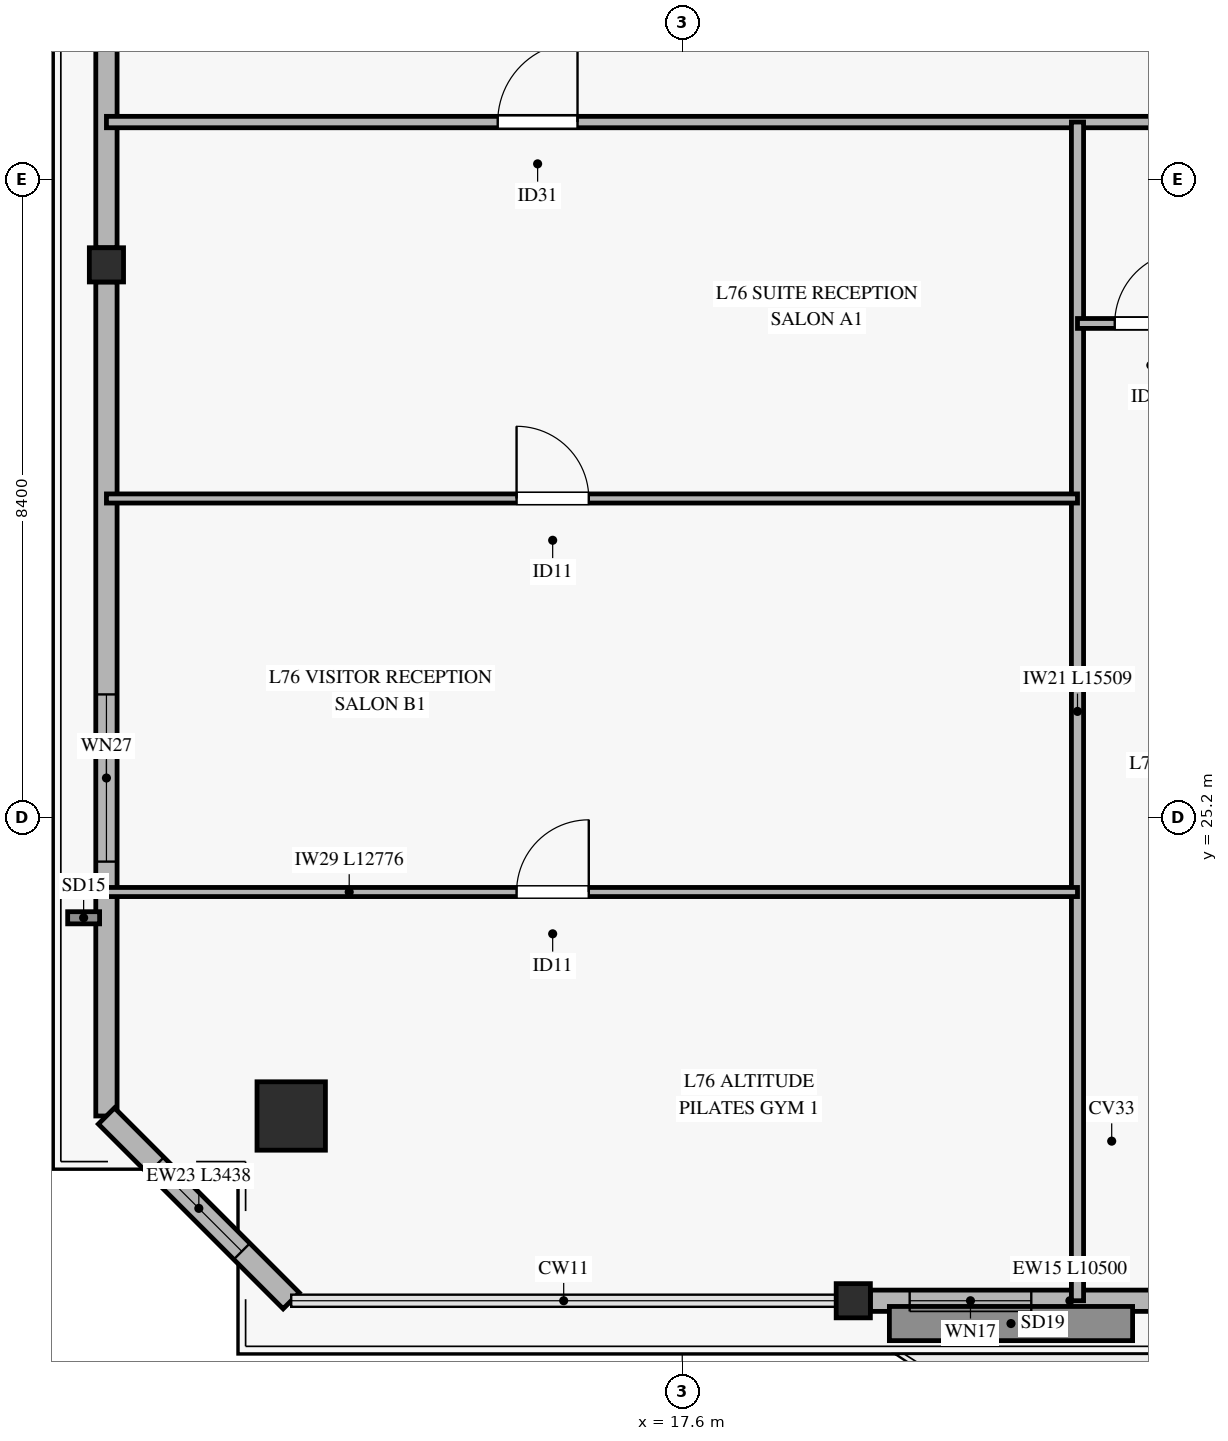
"""IFC4 building model, lengths in metres.
Left out: names, types, materials, properties, quantities, classifications, styles, units other than length and angle.
Written with IfcOpenShell. Run it as: python <this file> out.ifc"""

import sys

from ifc_helpers import new_model, si_unit, direction, frame, frame_2d, origin, origin_2d, place, context, subcontext, project, spatial, rectangle, hollow_rectangle, extrude, source, transform, mapped, element, fill, save


model = new_model("IFC4")
c1 = context("Model", 3, precision=1e-05, world=origin(), true_north=direction((0.0, 1.0)))
c2 = subcontext(c1, "Body", "Model", "MODEL_VIEW")
j1 = project(units=[si_unit("LENGTHUNIT", "METRE"), si_unit("PLANEANGLEUNIT", "RADIAN")], contexts=[c1])
p1 = place(None, origin())
s1 = spatial("IfcSite", under=j1, at=p1, CompositionType="ELEMENT")
p2 = place(p1, origin())
s2 = spatial("IfcBuilding", under=s1, at=p2, CompositionType="ELEMENT")
p3 = place(p2, frame((0.0, 0.0, 297.2)))
s3 = spatial("IfcBuildingStorey", under=s2, at=p3, CompositionType="ELEMENT", Elevation=297.2)
m1 = source(origin(), c2, "Body", "SweptSolid", [
    extrude(hollow_rectangle(XDim=0.9, YDim=0.9, WallThickness=0.04, at=origin_2d()), origin(), (0.0, 0.0, 1.0), 3.185),
])
p4 = place(p3, frame((12.455, 21.272, 0.0), z_axis=(0.0, 0.0, 1.0), x_axis=(1.0, 0.0, 0.0)))
e1 = element("IfcColumn", 1, at=p4, inside=s3, PredefinedType="COLUMN", context=c2, shape_type="MappedRepresentation", body=[
    mapped(m1, transform((0.0, 0.0, 0.0), x_axis=(1.0, 0.0, 0.0), y_axis=(0.0, 1.0, 0.0), z_axis=(0.0, 0.0, 1.0), scale=1.0)),
])
m2 = source(origin(), c2, "Body", "SweptSolid", [
    extrude(hollow_rectangle(XDim=0.45, YDim=0.45, WallThickness=0.022, at=origin_2d()), origin(), (0.0, 0.0, 1.0), 3.185),
])
for number, where, z_axis, x_axis in (
    (2, (19.85, 18.841, 0.0), (0.0, 0.0, 1.0), (1.0, 0.0, 0.0)),
    (3, (10.024, 32.471, 0.0), (0.0, 0.0, 1.0), (1.0, 0.0, 0.0)),
):
    element("IfcColumn", number, at=place(p3, frame(where, z_axis=z_axis, x_axis=x_axis)), inside=s3, PredefinedType="COLUMN", context=c2, shape_type="MappedRepresentation", body=[
        mapped(m2, transform((0.0, 0.0, 0.0), x_axis=(1.0, 0.0, 0.0), y_axis=(0.0, 1.0, 0.0), z_axis=(0.0, 0.0, 1.0), scale=1.0)),
    ])
p5 = place(p3, frame((20.075, 18.841, 0.0), z_axis=(0.0, 0.0, 1.0), x_axis=(1.0, 0.0, 0.0)))
e4 = element("IfcWall", 4, at=p5, inside=s3, PredefinedType="SOLIDWALL", context=c2, shape_type="SweptSolid", body=[
    extrude(rectangle(XDim=10.5, YDim=0.28, at=frame_2d((5.25, 0.0))), origin(), (0.0, 0.0, 1.0), 2.815),
])
p6 = place(p5, frame((4.325, 0.0, 0.0)))
e5 = element("IfcOpeningElement", 5, at=p6, cuts=e4, PredefinedType="OPENING", context=c2, shape_type="SweptSolid", body=[
    extrude(rectangle(XDim=1.8, YDim=2.25, at=frame_2d((0.9, 1.125))), frame((0.0, 0.15, 0.0), z_axis=(0.0, -1.0, 0.0), x_axis=(1.0, 0.0, 0.0)), (0.0, 0.0, 1.0), 0.3),
])
p7 = place(p5, frame((0.517, 0.0, 0.45)))
e6 = element("IfcOpeningElement", 6, at=p7, cuts=e4, PredefinedType="OPENING", context=c2, shape_type="SweptSolid", body=[
    extrude(rectangle(XDim=1.6, YDim=2.0, at=frame_2d((0.8, 1.0))), frame((0.0, 0.15, 0.0), z_axis=(0.0, -1.0, 0.0), x_axis=(1.0, 0.0, 0.0)), (0.0, 0.0, 1.0), 0.3),
])
p8 = place(p5, frame((7.305, 0.0, 0.45)))
e7 = element("IfcOpeningElement", 7, at=p8, cuts=e4, PredefinedType="OPENING", context=c2, shape_type="SweptSolid", body=[
    extrude(rectangle(XDim=1.6, YDim=2.0, at=frame_2d((0.8, 1.0))), frame((0.0, 0.15, 0.0), z_axis=(0.0, -1.0, 0.0), x_axis=(1.0, 0.0, 0.0)), (0.0, 0.0, 1.0), 0.3),
])
p9 = place(p3, frame((10.024, 21.272, 0.0), z_axis=(0.0, 0.0, 1.0), x_axis=(0.0, 1.0, 0.0)))
e8 = element("IfcWall", 8, at=p9, inside=s3, PredefinedType="SOLIDWALL", context=c2, shape_type="SweptSolid", body=[
    extrude(rectangle(XDim=10.974, YDim=0.28, at=frame_2d((5.487, 0.0))), origin(), (0.0, 0.0, 1.0), 2.815),
])
p10 = place(p9, frame((3.347, 0.0, 0.45)))
e9 = element("IfcOpeningElement", 9, at=p10, cuts=e8, PredefinedType="OPENING", context=c2, shape_type="SweptSolid", body=[
    extrude(rectangle(XDim=2.2, YDim=2.1, at=frame_2d((1.1, 1.05))), frame((0.0, 0.15, 0.0), z_axis=(0.0, -1.0, 0.0), x_axis=(1.0, 0.0, 0.0)), (0.0, 0.0, 1.0), 0.3),
])
p11 = place(p3, frame((10.024, 32.696, 0.0), z_axis=(0.0, 0.0, 1.0), x_axis=(0.0, 1.0, 0.0)))
e10 = element("IfcWall", 10, at=p11, inside=s3, PredefinedType="SOLIDWALL", context=c2, shape_type="SweptSolid", body=[
    extrude(rectangle(XDim=10.973, YDim=0.28, at=frame_2d((5.486, 0.0))), origin(), (0.0, 0.0, 1.0), 2.815),
])
p12 = place(p11, frame((6.488, 0.0, 0.45)))
e11 = element("IfcOpeningElement", 11, at=p12, cuts=e10, PredefinedType="OPENING", context=c2, shape_type="SweptSolid", body=[
    extrude(rectangle(XDim=2.2, YDim=2.1, at=frame_2d((1.1, 1.05))), frame((0.0, 0.15, 0.0), z_axis=(0.0, -1.0, 0.0), x_axis=(1.0, 0.0, 0.0)), (0.0, 0.0, 1.0), 0.3),
])
p13 = place(p3, frame((10.024, 21.272, 0.0), z_axis=(0.0, 0.0, 1.0), x_axis=(0.707142286536, -0.707071274055, 0.0)))
e12 = element("IfcWall", 12, at=p13, inside=s3, PredefinedType="SOLIDWALL", context=c2, shape_type="SweptSolid", body=[
    extrude(rectangle(XDim=3.438, YDim=0.3, at=frame_2d((1.719, 0.0))), origin(), (0.0, 0.0, 1.0), 2.815),
])
p14 = place(p13, frame((0.919, 0.0, 0.45)))
e13 = element("IfcOpeningElement", 13, at=p14, cuts=e12, PredefinedType="OPENING", context=c2, shape_type="SweptSolid", body=[
    extrude(rectangle(XDim=1.6, YDim=2.0, at=frame_2d((0.8, 1.0))), frame((0.0, 0.16, 0.0), z_axis=(0.0, -1.0, 0.0), x_axis=(1.0, 0.0, 0.0)), (0.0, 0.0, 1.0), 0.32),
])
p15 = place(p3, frame((10.024, 34.35, 0.0), z_axis=(0.0, 0.0, 1.0), x_axis=(1.0, 0.0, 0.0)))
e14 = element("IfcWall", 14, at=p15, inside=s3, PredefinedType="PARTITIONING", context=c2, shape_type="SweptSolid", body=[
    extrude(rectangle(XDim=50.352, YDim=0.15, at=frame_2d((25.176, 0.0))), origin(), (0.0, 0.0, 1.0), 2.47),
])
p16 = place(p15, frame((5.148, 0.0, 0.0)))
e15 = element("IfcOpeningElement", 15, at=p16, cuts=e14, PredefinedType="OPENING", context=c2, shape_type="SweptSolid", body=[
    extrude(rectangle(XDim=1.05, YDim=2.15, at=frame_2d((0.525, 1.075))), frame((0.0, 0.085, 0.0), z_axis=(0.0, -1.0, 0.0), x_axis=(1.0, 0.0, 0.0)), (0.0, 0.0, 1.0), 0.17),
])
p17 = place(p15, frame((15.651, 0.0, 0.0)))
e16 = element("IfcOpeningElement", 16, at=p17, cuts=e14, PredefinedType="OPENING", context=c2, shape_type="SweptSolid", body=[
    extrude(rectangle(XDim=1.05, YDim=2.15, at=frame_2d((0.525, 1.075))), frame((0.0, 0.085, 0.0), z_axis=(0.0, -1.0, 0.0), x_axis=(1.0, 0.0, 0.0)), (0.0, 0.0, 1.0), 0.17),
])
p18 = place(p15, frame((22.129, 0.0, 0.0)))
e17 = element("IfcOpeningElement", 17, at=p18, cuts=e14, PredefinedType="OPENING", context=c2, shape_type="SweptSolid", body=[
    extrude(rectangle(XDim=1.05, YDim=2.15, at=frame_2d((0.525, 1.075))), frame((0.0, 0.085, 0.0), z_axis=(0.0, -1.0, 0.0), x_axis=(1.0, 0.0, 0.0)), (0.0, 0.0, 1.0), 0.17),
])
p19 = place(p15, frame((29.151, 0.0, 0.0)))
e18 = element("IfcOpeningElement", 18, at=p19, cuts=e14, PredefinedType="OPENING", context=c2, shape_type="SweptSolid", body=[
    extrude(rectangle(XDim=1.05, YDim=2.15, at=frame_2d((0.525, 1.075))), frame((0.0, 0.085, 0.0), z_axis=(0.0, -1.0, 0.0), x_axis=(1.0, 0.0, 0.0)), (0.0, 0.0, 1.0), 0.17),
])
p20 = place(p15, frame((35.701, 0.0, 0.0)))
e19 = element("IfcOpeningElement", 19, at=p20, cuts=e14, PredefinedType="OPENING", context=c2, shape_type="SweptSolid", body=[
    extrude(rectangle(XDim=1.05, YDim=2.15, at=frame_2d((0.525, 1.075))), frame((0.0, 0.085, 0.0), z_axis=(0.0, -1.0, 0.0), x_axis=(1.0, 0.0, 0.0)), (0.0, 0.0, 1.0), 0.17),
])
p21 = place(p15, frame((43.578, 0.0, 0.0)))
e20 = element("IfcOpeningElement", 20, at=p21, cuts=e14, PredefinedType="OPENING", context=c2, shape_type="SweptSolid", body=[
    extrude(rectangle(XDim=1.05, YDim=2.15, at=frame_2d((0.525, 1.075))), frame((0.0, 0.085, 0.0), z_axis=(0.0, -1.0, 0.0), x_axis=(1.0, 0.0, 0.0)), (0.0, 0.0, 1.0), 0.17),
])
p22 = place(p3, frame((22.8, 18.841, 0.0), z_axis=(0.0, 0.0, 1.0), x_axis=(0.0, 1.0, 0.0)))
e21 = element("IfcWall", 21, at=p22, inside=s3, PredefinedType="PARTITIONING", context=c2, shape_type="SweptSolid", body=[
    extrude(rectangle(XDim=15.509, YDim=0.16, at=frame_2d((7.754, 0.0))), origin(), (0.0, 0.0, 1.0), 2.77),
])
p23 = place(p3, frame((10.024, 24.219, 0.0), z_axis=(0.0, 0.0, 1.0), x_axis=(1.0, 0.0, 0.0)))
e22 = element("IfcWall", 22, at=p23, inside=s3, PredefinedType="PARTITIONING", context=c2, shape_type="SweptSolid", body=[
    extrude(rectangle(XDim=12.776, YDim=0.12, at=frame_2d((6.388, 0.0))), origin(), (0.0, 0.0, 1.0), 2.47),
])
p24 = place(p23, frame((5.396, 0.0, 0.0)))
e23 = element("IfcOpeningElement", 23, at=p24, cuts=e22, PredefinedType="OPENING", context=c2, shape_type="SweptSolid", body=[
    extrude(rectangle(XDim=0.95, YDim=2.1, at=frame_2d((0.475, 1.05))), frame((0.0, 0.07, 0.0), z_axis=(0.0, -1.0, 0.0), x_axis=(1.0, 0.0, 0.0)), (0.0, 0.0, 1.0), 0.14),
])
p25 = place(p3, frame((10.024, 29.397, 0.0), z_axis=(0.0, 0.0, 1.0), x_axis=(1.0, 0.0, 0.0)))
e24 = element("IfcWall", 24, at=p25, inside=s3, PredefinedType="PARTITIONING", context=c2, shape_type="SweptSolid", body=[
    extrude(rectangle(XDim=12.776, YDim=0.12, at=frame_2d((6.388, 0.0))), origin(), (0.0, 0.0, 1.0), 2.47),
])
p26 = place(p25, frame((5.396, 0.0, 0.0)))
e25 = element("IfcOpeningElement", 25, at=p26, cuts=e24, PredefinedType="OPENING", context=c2, shape_type="SweptSolid", body=[
    extrude(rectangle(XDim=0.95, YDim=2.1, at=frame_2d((0.475, 1.05))), frame((0.0, 0.07, 0.0), z_axis=(0.0, -1.0, 0.0), x_axis=(1.0, 0.0, 0.0)), (0.0, 0.0, 1.0), 0.14),
])
p27 = place(p3, frame((22.8, 31.7, 0.0), z_axis=(0.0, 0.0, 1.0), x_axis=(1.0, 0.0, 0.0)))
e26 = element("IfcWall", 26, at=p27, inside=s3, PredefinedType="PARTITIONING", context=c2, shape_type="SweptSolid", body=[
    extrude(rectangle(XDim=1.69, YDim=0.13, at=frame_2d((0.845, 0.0))), origin(), (0.0, 0.0, 1.0), 3.185),
])
p28 = place(p27, frame((0.49, 0.0, 0.0)))
e27 = element("IfcOpeningElement", 27, at=p28, cuts=e26, PredefinedType="OPENING", context=c2, shape_type="SweptSolid", body=[
    extrude(rectangle(XDim=0.95, YDim=2.1, at=frame_2d((0.475, 1.05))), frame((0.0, 0.075, 0.0), z_axis=(0.0, -1.0, 0.0), x_axis=(1.0, 0.0, 0.0)), (0.0, 0.0, 1.0), 0.15),
])
m3 = source(origin(), c2, "Body", "SweptSolid", [
    extrude(rectangle(XDim=1.6, YDim=2.0, at=frame_2d((0.8, 1.0))), frame((0.0, 0.03, 0.0), z_axis=(0.0, -1.0, 0.0), x_axis=(1.0, 0.0, 0.0)), (0.0, 0.0, 1.0), 0.06),
])
p29 = place(p7, origin())
e28 = element("IfcWindow", 28, at=p29, inside=s3, PartitioningType="SINGLE_PANEL", PredefinedType="WINDOW", context=c2, shape_type="MappedRepresentation", body=[
    mapped(m3, transform((0.0, 0.0, 0.0), x_axis=(1.0, 0.0, 0.0), y_axis=(0.0, 1.0, 0.0), z_axis=(0.0, 0.0, 1.0), scale=1.0)),
])
fill(e6, e28)
m4 = source(origin(), c2, "Body", "SweptSolid", [
    extrude(rectangle(XDim=2.2, YDim=2.1, at=frame_2d((1.1, 1.05))), frame((0.0, 0.03, 0.0), z_axis=(0.0, -1.0, 0.0), x_axis=(1.0, 0.0, 0.0)), (0.0, 0.0, 1.0), 0.06),
])
p30 = place(p10, origin())
e29 = element("IfcWindow", 29, at=p30, inside=s3, PartitioningType="SINGLE_PANEL", PredefinedType="WINDOW", context=c2, shape_type="MappedRepresentation", body=[
    mapped(m4, transform((0.0, 0.0, 0.0), x_axis=(1.0, 0.0, 0.0), y_axis=(0.0, 1.0, 0.0), z_axis=(0.0, 0.0, 1.0), scale=1.0)),
])
fill(e9, e29)
p31 = place(p14, origin())
e30 = element("IfcWindow", 30, at=p31, inside=s3, PartitioningType="SINGLE_PANEL", PredefinedType="WINDOW", context=c2, shape_type="MappedRepresentation", body=[
    mapped(m3, transform((0.0, 0.0, 0.0), x_axis=(1.0, 0.0, 0.0), y_axis=(0.0, 1.0, 0.0), z_axis=(0.0, 0.0, 1.0), scale=1.0)),
])
fill(e13, e30)
m5 = source(origin(), c2, "Body", "SweptSolid", [
    extrude(rectangle(XDim=1.05, YDim=2.15, at=frame_2d((0.525, 1.075))), frame((0.0, 0.025, 0.0), z_axis=(0.0, -1.0, 0.0), x_axis=(1.0, 0.0, 0.0)), (0.0, 0.0, 1.0), 0.05),
])
p32 = place(p16, origin())
e31 = element("IfcDoor", 31, at=p32, inside=s3, OperationType="SINGLE_SWING_RIGHT", PredefinedType="DOOR", context=c2, shape_type="MappedRepresentation", body=[
    mapped(m5, transform((0.0, 0.0, 0.0), x_axis=(1.0, 0.0, 0.0), y_axis=(0.0, 1.0, 0.0), z_axis=(0.0, 0.0, 1.0), scale=1.0)),
])
fill(e15, e31)
m6 = source(origin(), c2, "Body", "SweptSolid", [
    extrude(rectangle(XDim=0.95, YDim=2.1, at=frame_2d((0.475, 1.05))), frame((0.0, 0.025, 0.0), z_axis=(0.0, -1.0, 0.0), x_axis=(1.0, 0.0, 0.0)), (0.0, 0.0, 1.0), 0.05),
])
p33 = place(p26, origin())
e32 = element("IfcDoor", 32, at=p33, inside=s3, OperationType="SINGLE_SWING_LEFT", PredefinedType="DOOR", context=c2, shape_type="MappedRepresentation", body=[
    mapped(m6, transform((0.0, 0.0, 0.0), x_axis=(1.0, 0.0, 0.0), y_axis=(0.0, 1.0, 0.0), z_axis=(0.0, 0.0, 1.0), scale=1.0)),
])
fill(e25, e32)
p34 = place(p24, origin())
e33 = element("IfcDoor", 33, at=p34, inside=s3, OperationType="SINGLE_SWING_RIGHT", PredefinedType="DOOR", context=c2, shape_type="MappedRepresentation", body=[
    mapped(m6, transform((0.0, 0.0, 0.0), x_axis=(1.0, 0.0, 0.0), y_axis=(0.0, 1.0, 0.0), z_axis=(0.0, 0.0, 1.0), scale=1.0)),
])
fill(e23, e33)
p35 = place(p28, origin())
e34 = element("IfcDoor", 34, at=p35, inside=s3, OperationType="SINGLE_SWING_RIGHT", PredefinedType="DOOR", context=c2, shape_type="MappedRepresentation", body=[
    mapped(m6, transform((0.0, 0.0, 0.0), x_axis=(1.0, 0.0, 0.0), y_axis=(0.0, 1.0, 0.0), z_axis=(0.0, 0.0, 1.0), scale=1.0)),
])
fill(e27, e34)
save(model, sys.argv[1])
